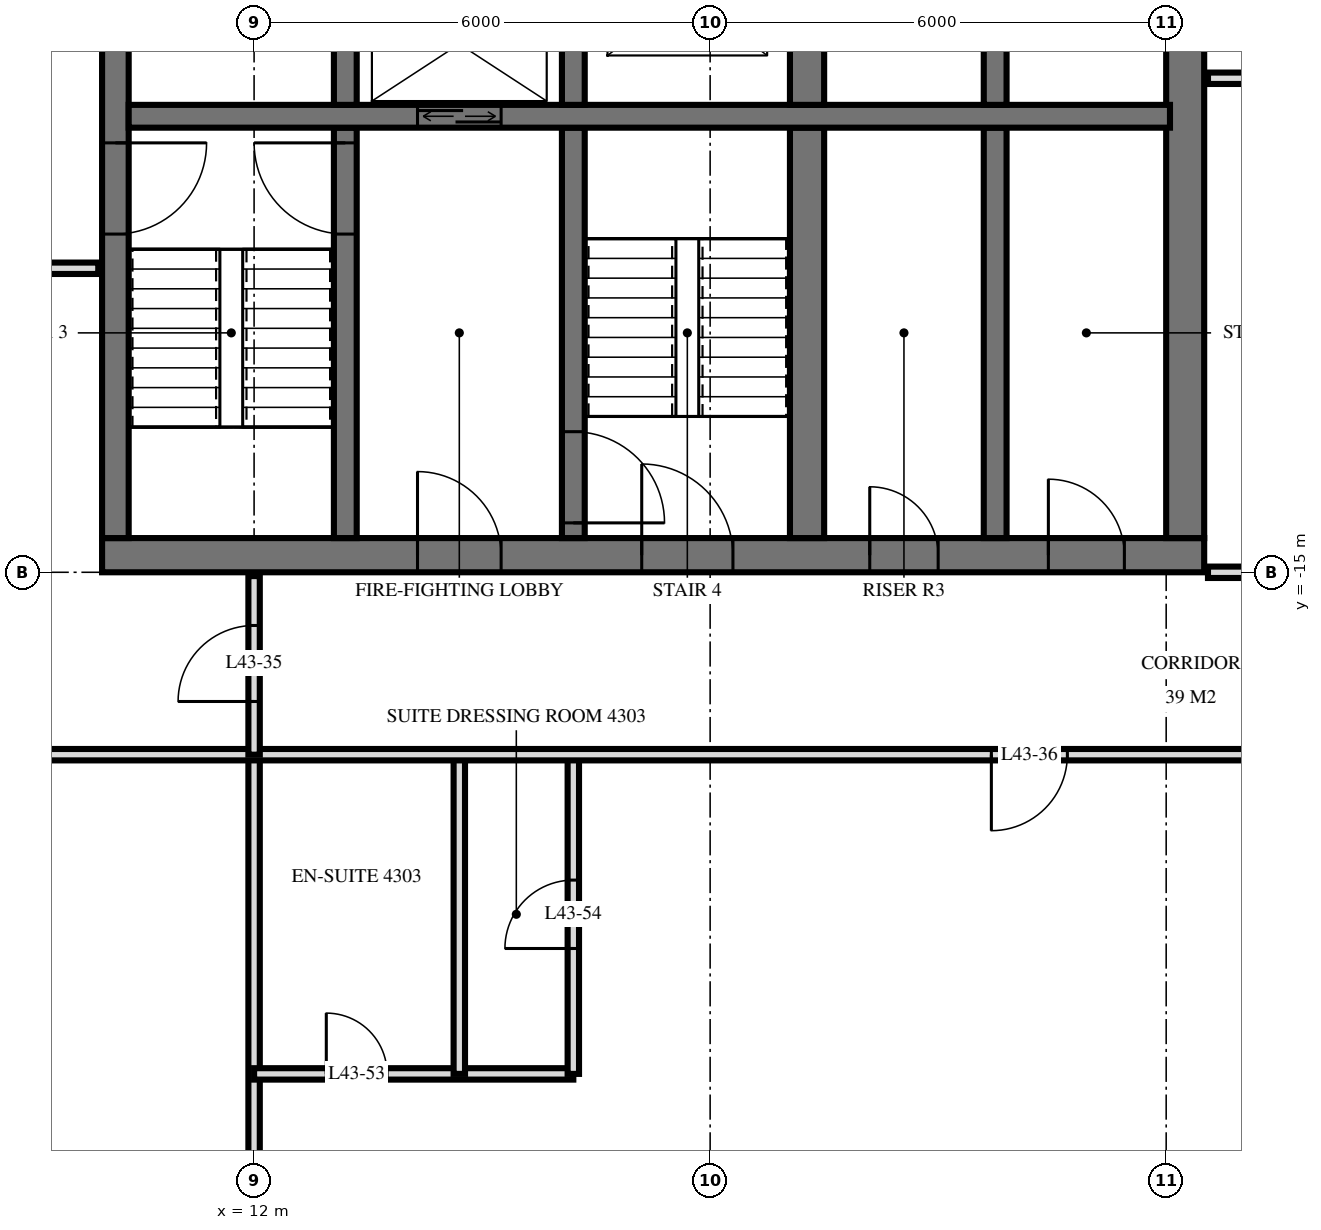
"""IFC4 building model, lengths in metres.
Left out: names, types, materials, properties, quantities, classifications, styles, units other than length and angle.
Written with IfcOpenShell. Run it as: python <this file> out.ifc"""

import sys

from ifc_helpers import new_model, si_unit, direction, frame, frame_2d, origin, place, context, subcontext, project, spatial, rectangle, extrude, element, fill, save


model = new_model("IFC4")
c1 = context("Model", 3, precision=1e-05, world=origin(), true_north=direction((0.0, 1.0)))
c2 = subcontext(c1, "Body", "Model", "MODEL_VIEW")
j1 = project(units=[si_unit("LENGTHUNIT", "METRE"), si_unit("PLANEANGLEUNIT", "RADIAN")], contexts=[c1])
p1 = place(None, origin())
s1 = spatial("IfcSite", under=j1, at=p1, CompositionType="ELEMENT")
p2 = place(p1, origin())
s2 = spatial("IfcBuilding", under=s1, at=p2, CompositionType="ELEMENT")
p3 = place(p2, frame((0.0, 0.0, 166.8)))
s3 = spatial("IfcBuildingStorey", under=s2, at=p3, CompositionType="ELEMENT", Elevation=166.8)
p4 = place(p3, frame((10.0, -14.775, 0.0), z_axis=(0.0, 0.0, 1.0), x_axis=(1.0, 0.0, 0.0)))
e1 = element("IfcWall", 1, at=p4, inside=s3, PredefinedType="SHEAR", context=c2, shape_type="SweptSolid", body=[
    extrude(rectangle(XDim=14.5, YDim=0.45, at=frame_2d((7.25, 0.0))), origin(), (0.0, 0.0, 1.0), 3.6),
])
p5 = place(p4, frame((7.1, 0.0, 0.0)))
e2 = element("IfcOpeningElement", 2, at=p5, cuts=e1, PredefinedType="OPENING", context=c2, shape_type="SweptSolid", body=[
    extrude(rectangle(XDim=1.2, YDim=2.1, at=frame_2d((0.6, 1.05))), frame((0.0, 0.235, 0.0), z_axis=(0.0, -1.0, 0.0), x_axis=(1.0, 0.0, 0.0)), (0.0, 0.0, 1.0), 0.47),
])
p6 = place(p4, frame((4.15, 0.0, 0.0)))
e3 = element("IfcOpeningElement", 3, at=p6, cuts=e1, PredefinedType="OPENING", context=c2, shape_type="SweptSolid", body=[
    extrude(rectangle(XDim=1.1, YDim=2.1, at=frame_2d((0.55, 1.05))), frame((0.0, 0.235, 0.0), z_axis=(0.0, -1.0, 0.0), x_axis=(1.0, 0.0, 0.0)), (0.0, 0.0, 1.0), 0.47),
])
p7 = place(p4, frame((10.1, 0.0, 0.0)))
e4 = element("IfcOpeningElement", 4, at=p7, cuts=e1, PredefinedType="OPENING", context=c2, shape_type="SweptSolid", body=[
    extrude(rectangle(XDim=0.9, YDim=2.1, at=frame_2d((0.45, 1.05))), frame((0.0, 0.235, 0.0), z_axis=(0.0, -1.0, 0.0), x_axis=(1.0, 0.0, 0.0)), (0.0, 0.0, 1.0), 0.47),
])
p8 = place(p4, frame((12.45, 0.0, 0.0)))
e5 = element("IfcOpeningElement", 5, at=p8, cuts=e1, PredefinedType="OPENING", context=c2, shape_type="SweptSolid", body=[
    extrude(rectangle(XDim=1.0, YDim=2.1, at=frame_2d((0.5, 1.05))), frame((0.0, 0.235, 0.0), z_axis=(0.0, -1.0, 0.0), x_axis=(1.0, 0.0, 0.0)), (0.0, 0.0, 1.0), 0.47),
])
p9 = place(p3, frame((10.175, -14.55, 0.0), z_axis=(0.0, 0.0, 1.0), x_axis=(0.0, 1.0, 0.0)))
e6 = element("IfcWall", 6, at=p9, inside=s3, PredefinedType="SHEAR", context=c2, shape_type="SweptSolid", body=[
    extrude(rectangle(XDim=14.1, YDim=0.35, at=frame_2d((7.05, 0.0))), origin(), (0.0, 0.0, 1.0), 3.6),
])
p10 = place(p9, frame((8.4, 0.0, 0.0)))
e7 = element("IfcOpeningElement", 7, at=p10, cuts=e6, PredefinedType="OPENING", context=c2, shape_type="SweptSolid", body=[
    extrude(rectangle(XDim=1.4, YDim=2.4, at=frame_2d((0.7, 1.2))), frame((0.0, 0.185, 0.0), z_axis=(0.0, -1.0, 0.0), x_axis=(1.0, 0.0, 0.0)), (0.0, 0.0, 1.0), 0.37),
])
p11 = place(p9, frame((10.0, 0.0, 0.0)))
e8 = element("IfcOpeningElement", 8, at=p11, cuts=e6, PredefinedType="OPENING", context=c2, shape_type="SweptSolid", body=[
    extrude(rectangle(XDim=1.4, YDim=2.4, at=frame_2d((0.7, 1.2))), frame((0.0, 0.185, 0.0), z_axis=(0.0, -1.0, 0.0), x_axis=(1.0, 0.0, 0.0)), (0.0, 0.0, 1.0), 0.37),
])
p12 = place(p9, frame((4.0, 0.0, 0.0)))
e9 = element("IfcOpeningElement", 9, at=p12, cuts=e6, PredefinedType="OPENING", context=c2, shape_type="SweptSolid", body=[
    extrude(rectangle(XDim=1.2, YDim=2.1, at=frame_2d((0.6, 1.05))), frame((0.0, 0.185, 0.0), z_axis=(0.0, -1.0, 0.0), x_axis=(1.0, 0.0, 0.0)), (0.0, 0.0, 1.0), 0.37),
])
p13 = place(p3, frame((24.25, -14.55, 0.0), z_axis=(0.0, 0.0, 1.0), x_axis=(0.0, 1.0, 0.0)))
e10 = element("IfcWall", 10, at=p13, inside=s3, PredefinedType="SHEAR", context=c2, shape_type="SweptSolid", body=[
    extrude(rectangle(XDim=14.1, YDim=0.5, at=frame_2d((7.05, 0.0))), origin(), (0.0, 0.0, 1.0), 3.6),
])
p14 = place(p3, frame((10.35, -9.0, 0.0), z_axis=(0.0, 0.0, 1.0), x_axis=(1.0, 0.0, 0.0)))
e11 = element("IfcWall", 11, at=p14, inside=s3, PredefinedType="SHEAR", context=c2, shape_type="SweptSolid", body=[
    extrude(rectangle(XDim=13.7, YDim=0.3, at=frame_2d((6.85, 0.0))), origin(), (0.0, 0.0, 1.0), 3.6),
])
p15 = place(p14, frame((3.8, 0.0, 0.0)))
e12 = element("IfcOpeningElement", 12, at=p15, cuts=e11, PredefinedType="OPENING", context=c2, shape_type="SweptSolid", body=[
    extrude(rectangle(XDim=1.1, YDim=2.1, at=frame_2d((0.55, 1.05))), frame((0.0, 0.16, 0.0), z_axis=(0.0, -1.0, 0.0), x_axis=(1.0, 0.0, 0.0)), (0.0, 0.0, 1.0), 0.32),
])
p16 = place(p3, frame((13.2, -8.85, 0.0), z_axis=(0.0, 0.0, 1.0), x_axis=(0.0, 1.0, 0.0)))
e13 = element("IfcWall", 13, at=p16, inside=s3, PredefinedType="SHEAR", context=c2, shape_type="SweptSolid", body=[
    extrude(rectangle(XDim=2.3, YDim=0.3, at=frame_2d((1.15, 0.0))), origin(), (0.0, 0.0, 1.0), 3.6),
])
p17 = place(p3, frame((13.2, -14.55, 0.0), z_axis=(0.0, 0.0, 1.0), x_axis=(0.0, 1.0, 0.0)))
e14 = element("IfcWall", 14, at=p17, inside=s3, PredefinedType="SHEAR", context=c2, shape_type="SweptSolid", body=[
    extrude(rectangle(XDim=5.4, YDim=0.3, at=frame_2d((2.7, 0.0))), origin(), (0.0, 0.0, 1.0), 3.6),
])
p18 = place(p17, frame((4.0, 0.0, 0.0)))
e15 = element("IfcOpeningElement", 15, at=p18, cuts=e14, PredefinedType="OPENING", context=c2, shape_type="SweptSolid", body=[
    extrude(rectangle(XDim=1.2, YDim=2.1, at=frame_2d((0.6, 1.05))), frame((0.0, 0.16, 0.0), z_axis=(0.0, -1.0, 0.0), x_axis=(1.0, 0.0, 0.0)), (0.0, 0.0, 1.0), 0.32),
])
p19 = place(p3, frame((16.2, -8.85, 0.0), z_axis=(0.0, 0.0, 1.0), x_axis=(0.0, 1.0, 0.0)))
e16 = element("IfcWall", 16, at=p19, inside=s3, PredefinedType="SHEAR", context=c2, shape_type="SweptSolid", body=[
    extrude(rectangle(XDim=2.3, YDim=0.3, at=frame_2d((1.15, 0.0))), origin(), (0.0, 0.0, 1.0), 3.6),
])
p20 = place(p3, frame((16.2, -14.55, 0.0), z_axis=(0.0, 0.0, 1.0), x_axis=(0.0, 1.0, 0.0)))
e17 = element("IfcWall", 17, at=p20, inside=s3, PredefinedType="SHEAR", context=c2, shape_type="SweptSolid", body=[
    extrude(rectangle(XDim=5.4, YDim=0.3, at=frame_2d((2.7, 0.0))), origin(), (0.0, 0.0, 1.0), 3.6),
])
p21 = place(p20, frame((0.2, 0.0, 0.0)))
e18 = element("IfcOpeningElement", 18, at=p21, cuts=e17, PredefinedType="OPENING", context=c2, shape_type="SweptSolid", body=[
    extrude(rectangle(XDim=1.2, YDim=2.1, at=frame_2d((0.6, 1.05))), frame((0.0, 0.16, 0.0), z_axis=(0.0, -1.0, 0.0), x_axis=(1.0, 0.0, 0.0)), (0.0, 0.0, 1.0), 0.32),
])
p22 = place(p3, frame((19.275, -8.85, 0.0), z_axis=(0.0, 0.0, 1.0), x_axis=(0.0, 1.0, 0.0)))
e19 = element("IfcWall", 19, at=p22, inside=s3, PredefinedType="SHEAR", context=c2, shape_type="SweptSolid", body=[
    extrude(rectangle(XDim=2.3, YDim=0.45, at=frame_2d((1.15, 0.0))), origin(), (0.0, 0.0, 1.0), 3.6),
])
p23 = place(p3, frame((19.275, -14.55, 0.0), z_axis=(0.0, 0.0, 1.0), x_axis=(0.0, 1.0, 0.0)))
e20 = element("IfcWall", 20, at=p23, inside=s3, PredefinedType="SHEAR", context=c2, shape_type="SweptSolid", body=[
    extrude(rectangle(XDim=5.4, YDim=0.45, at=frame_2d((2.7, 0.0))), origin(), (0.0, 0.0, 1.0), 3.6),
])
p24 = place(p3, frame((21.75, -8.85, 0.0), z_axis=(0.0, 0.0, 1.0), x_axis=(0.0, 1.0, 0.0)))
e21 = element("IfcWall", 21, at=p24, inside=s3, PredefinedType="SHEAR", context=c2, shape_type="SweptSolid", body=[
    extrude(rectangle(XDim=2.3, YDim=0.3, at=frame_2d((1.15, 0.0))), origin(), (0.0, 0.0, 1.0), 3.6),
])
p25 = place(p3, frame((21.75, -14.55, 0.0), z_axis=(0.0, 0.0, 1.0), x_axis=(0.0, 1.0, 0.0)))
e22 = element("IfcWall", 22, at=p25, inside=s3, PredefinedType="SHEAR", context=c2, shape_type="SweptSolid", body=[
    extrude(rectangle(XDim=5.4, YDim=0.3, at=frame_2d((2.7, 0.0))), origin(), (0.0, 0.0, 1.0), 3.6),
])
p26 = place(p3, frame((16.2, -21.6, 0.0), z_axis=(0.0, 0.0, 1.0), x_axis=(0.0, 1.0, 0.0)))
e23 = element("IfcWall", 23, at=p26, inside=s3, PredefinedType="PARTITIONING", context=c2, shape_type="SweptSolid", body=[
    extrude(rectangle(XDim=4.2, YDim=0.15, at=frame_2d((2.1, 0.0))), origin(), (0.0, 0.0, 1.0), 3.32),
])
p27 = place(p26, frame((1.65, 0.0, 0.0)))
e24 = element("IfcOpeningElement", 24, at=p27, cuts=e23, PredefinedType="OPENING", context=c2, shape_type="SweptSolid", body=[
    extrude(rectangle(XDim=0.9, YDim=2.1, at=frame_2d((0.45, 1.05))), frame((0.0, 0.085, 0.0), z_axis=(0.0, -1.0, 0.0), x_axis=(1.0, 0.0, 0.0)), (0.0, 0.0, 1.0), 0.17),
])
p28 = place(p3, frame((14.7, -21.6, 0.0), z_axis=(0.0, 0.0, 1.0), x_axis=(0.0, 1.0, 0.0)))
e25 = element("IfcWall", 25, at=p28, inside=s3, PredefinedType="PARTITIONING", context=c2, shape_type="SweptSolid", body=[
    extrude(rectangle(XDim=4.2, YDim=0.15, at=frame_2d((2.1, 0.0))), origin(), (0.0, 0.0, 1.0), 3.32),
])
p29 = place(p3, frame((12.0, -17.4, 0.0), z_axis=(0.0, 0.0, 1.0), x_axis=(0.0, 1.0, 0.0)))
e26 = element("IfcWall", 26, at=p29, inside=s3, PredefinedType="PARTITIONING", context=c2, shape_type="SweptSolid", body=[
    extrude(rectangle(XDim=2.35, YDim=0.15, at=frame_2d((1.175, 0.0))), origin(), (0.0, 0.0, 1.0), 3.32),
])
p30 = place(p29, frame((0.7, 0.0, 0.0)))
e27 = element("IfcOpeningElement", 27, at=p30, cuts=e26, PredefinedType="OPENING", context=c2, shape_type="SweptSolid", body=[
    extrude(rectangle(XDim=1.0, YDim=2.1, at=frame_2d((0.5, 1.05))), frame((0.0, 0.085, 0.0), z_axis=(0.0, -1.0, 0.0), x_axis=(1.0, 0.0, 0.0)), (0.0, 0.0, 1.0), 0.17),
])
p31 = place(p3, frame((12.0, -33.62, 0.0), z_axis=(0.0, 0.0, 1.0), x_axis=(0.0, 1.0, 0.0)))
e28 = element("IfcWall", 28, at=p31, inside=s3, PredefinedType="PARTITIONING", context=c2, shape_type="SweptSolid", body=[
    extrude(rectangle(XDim=16.22, YDim=0.15, at=frame_2d((8.11, 0.0))), origin(), (0.0, 0.0, 1.0), 3.32),
])
p32 = place(p3, frame((12.0, -21.6, 0.0), z_axis=(0.0, 0.0, 1.0), x_axis=(1.0, 0.0, 0.0)))
e29 = element("IfcWall", 29, at=p32, inside=s3, PredefinedType="PARTITIONING", context=c2, shape_type="SweptSolid", body=[
    extrude(rectangle(XDim=4.2, YDim=0.15, at=frame_2d((2.1, 0.0))), origin(), (0.0, 0.0, 1.0), 3.32),
])
p33 = place(p32, frame((0.95, 0.0, 0.0)))
e30 = element("IfcOpeningElement", 30, at=p33, cuts=e29, PredefinedType="OPENING", context=c2, shape_type="SweptSolid", body=[
    extrude(rectangle(XDim=0.8, YDim=2.1, at=frame_2d((0.4, 1.05))), frame((0.0, 0.085, 0.0), z_axis=(0.0, -1.0, 0.0), x_axis=(1.0, 0.0, 0.0)), (0.0, 0.0, 1.0), 0.17),
])
p34 = place(p3, frame((-28.02, -17.4, 0.0), z_axis=(0.0, 0.0, 1.0), x_axis=(1.0, 0.0, 0.0)))
e31 = element("IfcWall", 31, at=p34, inside=s3, PredefinedType="PARTITIONING", context=c2, shape_type="SweptSolid", body=[
    extrude(rectangle(XDim=56.04, YDim=0.15, at=frame_2d((28.02, 0.0))), origin(), (0.0, 0.0, 1.0), 3.32),
])
p35 = place(p34, frame((10.42, 0.0, 0.0)))
e32 = element("IfcOpeningElement", 32, at=p35, cuts=e31, PredefinedType="OPENING", context=c2, shape_type="SweptSolid", body=[
    extrude(rectangle(XDim=1.0, YDim=2.1, at=frame_2d((0.5, 1.05))), frame((0.0, 0.085, 0.0), z_axis=(0.0, -1.0, 0.0), x_axis=(1.0, 0.0, 0.0)), (0.0, 0.0, 1.0), 0.17),
])
p36 = place(p34, frame((2.32, 0.0, 0.0)))
e33 = element("IfcOpeningElement", 33, at=p36, cuts=e31, PredefinedType="OPENING", context=c2, shape_type="SweptSolid", body=[
    extrude(rectangle(XDim=1.0, YDim=2.1, at=frame_2d((0.5, 1.05))), frame((0.0, 0.085, 0.0), z_axis=(0.0, -1.0, 0.0), x_axis=(1.0, 0.0, 0.0)), (0.0, 0.0, 1.0), 0.17),
])
p37 = place(p34, frame((49.72, 0.0, 0.0)))
e34 = element("IfcOpeningElement", 34, at=p37, cuts=e31, PredefinedType="OPENING", context=c2, shape_type="SweptSolid", body=[
    extrude(rectangle(XDim=1.0, YDim=2.1, at=frame_2d((0.5, 1.05))), frame((0.0, 0.085, 0.0), z_axis=(0.0, -1.0, 0.0), x_axis=(1.0, 0.0, 0.0)), (0.0, 0.0, 1.0), 0.17),
])
p38 = place(p34, frame((23.02, 0.0, 0.0)))
e35 = element("IfcOpeningElement", 35, at=p38, cuts=e31, PredefinedType="OPENING", context=c2, shape_type="SweptSolid", body=[
    extrude(rectangle(XDim=1.0, YDim=2.1, at=frame_2d((0.5, 1.05))), frame((0.0, 0.085, 0.0), z_axis=(0.0, -1.0, 0.0), x_axis=(1.0, 0.0, 0.0)), (0.0, 0.0, 1.0), 0.17),
])
p39 = place(p34, frame((35.02, 0.0, 0.0)))
e36 = element("IfcOpeningElement", 36, at=p39, cuts=e31, PredefinedType="OPENING", context=c2, shape_type="SweptSolid", body=[
    extrude(rectangle(XDim=1.0, YDim=2.1, at=frame_2d((0.5, 1.05))), frame((0.0, 0.085, 0.0), z_axis=(0.0, -1.0, 0.0), x_axis=(1.0, 0.0, 0.0)), (0.0, 0.0, 1.0), 0.17),
])
p40 = place(p3, frame((24.55, -15.0, 0.0), z_axis=(0.0, 0.0, 1.0), x_axis=(1.0, 0.0, 0.0)))
e37 = element("IfcWall", 37, at=p40, inside=s3, PredefinedType="PARTITIONING", context=c2, shape_type="SweptSolid", body=[
    extrude(rectangle(XDim=3.47, YDim=0.15, at=frame_2d((1.735, 0.0))), origin(), (0.0, 0.0, 1.0), 3.32),
])
p41 = place(p40, frame((0.9, 0.0, 0.0)))
e38 = element("IfcOpeningElement", 38, at=p41, cuts=e37, PredefinedType="OPENING", context=c2, shape_type="SweptSolid", body=[
    extrude(rectangle(XDim=1.0, YDim=2.1, at=frame_2d((0.5, 1.05))), frame((0.0, 0.085, 0.0), z_axis=(0.0, -1.0, 0.0), x_axis=(1.0, 0.0, 0.0)), (0.0, 0.0, 1.0), 0.17),
])
p42 = place(p3, frame((-9.95, -11.0, 0.0), z_axis=(0.0, 0.0, 1.0), x_axis=(1.0, 0.0, 0.0)))
e39 = element("IfcWall", 39, at=p42, inside=s3, PredefinedType="PARTITIONING", context=c2, shape_type="SweptSolid", body=[
    extrude(rectangle(XDim=19.9, YDim=0.15, at=frame_2d((9.95, 0.0))), origin(), (0.0, 0.0, 1.0), 3.32),
])
p43 = place(p42, frame((9.45, 0.0, 0.0)))
e40 = element("IfcOpeningElement", 40, at=p43, cuts=e39, PredefinedType="OPENING", context=c2, shape_type="SweptSolid", body=[
    extrude(rectangle(XDim=1.0, YDim=2.1, at=frame_2d((0.5, 1.05))), frame((0.0, 0.085, 0.0), z_axis=(0.0, -1.0, 0.0), x_axis=(1.0, 0.0, 0.0)), (0.0, 0.0, 1.0), 0.17),
])
p44 = place(p42, frame((3.45, 0.0, 0.0)))
e41 = element("IfcOpeningElement", 41, at=p44, cuts=e39, PredefinedType="OPENING", context=c2, shape_type="SweptSolid", body=[
    extrude(rectangle(XDim=1.0, YDim=2.1, at=frame_2d((0.5, 1.05))), frame((0.0, 0.085, 0.0), z_axis=(0.0, -1.0, 0.0), x_axis=(1.0, 0.0, 0.0)), (0.0, 0.0, 1.0), 0.17),
])
p45 = place(p3, frame((24.55, -8.5, 0.0), z_axis=(0.0, 0.0, 1.0), x_axis=(1.0, 0.0, 0.0)))
e42 = element("IfcWall", 42, at=p45, inside=s3, PredefinedType="PARTITIONING", context=c2, shape_type="SweptSolid", body=[
    extrude(rectangle(XDim=3.47, YDim=0.15, at=frame_2d((1.735, 0.0))), origin(), (0.0, 0.0, 1.0), 3.32),
])
p46 = place(p45, frame((1.35, 0.0, 0.0)))
e43 = element("IfcOpeningElement", 43, at=p46, cuts=e42, PredefinedType="OPENING", context=c2, shape_type="SweptSolid", body=[
    extrude(rectangle(XDim=0.9, YDim=2.1, at=frame_2d((0.45, 1.05))), frame((0.0, 0.085, 0.0), z_axis=(0.0, -1.0, 0.0), x_axis=(1.0, 0.0, 0.0)), (0.0, 0.0, 1.0), 0.17),
])
p47 = place(p15, origin())
e44 = element("IfcDoor", 44, at=p47, inside=s3, OperationType="DOUBLE_DOOR_SLIDING", PredefinedType="USERDEFINED", context=c2, shape_type="SweptSolid", body=[
    extrude(rectangle(XDim=1.1, YDim=2.1, at=frame_2d((0.55, 1.05))), frame((0.0, 0.025, 0.0), z_axis=(0.0, -1.0, 0.0), x_axis=(1.0, 0.0, 0.0)), (0.0, 0.0, 1.0), 0.05),
])
fill(e12, e44)
p48 = place(p12, frame((0.6, 0.0, 0.0), z_axis=(0.0, 0.0, 1.0), x_axis=(-1.0, 0.0, 0.0)))
e45 = element("IfcDoor", 45, at=p48, inside=s3, OperationType="SINGLE_SWING_RIGHT", PredefinedType="DOOR", context=c2, shape_type="SweptSolid", body=[
    extrude(rectangle(XDim=1.2, YDim=2.1, at=frame_2d((0.0, 1.05))), frame((0.0, -0.025, 0.0), z_axis=(0.0, 1.0, 0.0), x_axis=(-1.0, 0.0, 0.0)), (0.0, 0.0, 1.0), 0.05),
])
fill(e9, e45)
p49 = place(p5, origin())
e46 = element("IfcDoor", 46, at=p49, inside=s3, OperationType="SINGLE_SWING_RIGHT", PredefinedType="DOOR", context=c2, shape_type="SweptSolid", body=[
    extrude(rectangle(XDim=1.2, YDim=2.1, at=frame_2d((0.6, 1.05))), frame((0.0, 0.025, 0.0), z_axis=(0.0, -1.0, 0.0), x_axis=(1.0, 0.0, 0.0)), (0.0, 0.0, 1.0), 0.05),
])
fill(e2, e46)
p50 = place(p6, origin())
e47 = element("IfcDoor", 47, at=p50, inside=s3, OperationType="SINGLE_SWING_RIGHT", PredefinedType="DOOR", context=c2, shape_type="SweptSolid", body=[
    extrude(rectangle(XDim=1.1, YDim=2.1, at=frame_2d((0.55, 1.05))), frame((0.0, 0.025, 0.0), z_axis=(0.0, -1.0, 0.0), x_axis=(1.0, 0.0, 0.0)), (0.0, 0.0, 1.0), 0.05),
])
fill(e3, e47)
p51 = place(p7, origin())
e48 = element("IfcDoor", 48, at=p51, inside=s3, OperationType="SINGLE_SWING_RIGHT", PredefinedType="DOOR", context=c2, shape_type="SweptSolid", body=[
    extrude(rectangle(XDim=0.9, YDim=2.1, at=frame_2d((0.45, 1.05))), frame((0.0, 0.025, 0.0), z_axis=(0.0, -1.0, 0.0), x_axis=(1.0, 0.0, 0.0)), (0.0, 0.0, 1.0), 0.05),
])
fill(e4, e48)
p52 = place(p8, origin())
e49 = element("IfcDoor", 49, at=p52, inside=s3, OperationType="SINGLE_SWING_RIGHT", PredefinedType="DOOR", context=c2, shape_type="SweptSolid", body=[
    extrude(rectangle(XDim=1.0, YDim=2.1, at=frame_2d((0.5, 1.05))), frame((0.0, 0.025, 0.0), z_axis=(0.0, -1.0, 0.0), x_axis=(1.0, 0.0, 0.0)), (0.0, 0.0, 1.0), 0.05),
])
fill(e5, e49)
p53 = place(p18, origin())
e50 = element("IfcDoor", 50, at=p53, inside=s3, OperationType="SINGLE_SWING_LEFT", PredefinedType="DOOR", context=c2, shape_type="SweptSolid", body=[
    extrude(rectangle(XDim=1.2, YDim=2.1, at=frame_2d((0.6, 1.05))), frame((0.0, 0.025, 0.0), z_axis=(0.0, -1.0, 0.0), x_axis=(1.0, 0.0, 0.0)), (0.0, 0.0, 1.0), 0.05),
])
fill(e15, e50)
p54 = place(p21, frame((0.6, 0.0, 0.0), z_axis=(0.0, 0.0, 1.0), x_axis=(-1.0, 0.0, 0.0)))
e51 = element("IfcDoor", 51, at=p54, inside=s3, OperationType="SINGLE_SWING_LEFT", PredefinedType="DOOR", context=c2, shape_type="SweptSolid", body=[
    extrude(rectangle(XDim=1.2, YDim=2.1, at=frame_2d((0.0, 1.05))), frame((0.0, -0.025, 0.0), z_axis=(0.0, 1.0, 0.0), x_axis=(-1.0, 0.0, 0.0)), (0.0, 0.0, 1.0), 0.05),
])
fill(e18, e51)
p55 = place(p30, origin())
e52 = element("IfcDoor", 52, at=p55, inside=s3, OperationType="SINGLE_SWING_RIGHT", PredefinedType="DOOR", context=c2, shape_type="SweptSolid", body=[
    extrude(rectangle(XDim=1.0, YDim=2.1, at=frame_2d((0.5, 1.05))), frame((0.0, 0.025, 0.0), z_axis=(0.0, -1.0, 0.0), x_axis=(1.0, 0.0, 0.0)), (0.0, 0.0, 1.0), 0.05),
])
fill(e27, e52)
p56 = place(p37, frame((0.5, 0.0, 0.0), z_axis=(0.0, 0.0, 1.0), x_axis=(-1.0, 0.0, 0.0)))
e53 = element("IfcDoor", 53, at=p56, inside=s3, OperationType="SINGLE_SWING_LEFT", PredefinedType="DOOR", context=c2, shape_type="SweptSolid", body=[
    extrude(rectangle(XDim=1.0, YDim=2.1, at=frame_2d((0.0, 1.05))), frame((0.0, -0.025, 0.0), z_axis=(0.0, 1.0, 0.0), x_axis=(-1.0, 0.0, 0.0)), (0.0, 0.0, 1.0), 0.05),
])
fill(e34, e53)
p57 = place(p33, origin())
e54 = element("IfcDoor", 54, at=p57, inside=s3, OperationType="SINGLE_SWING_RIGHT", PredefinedType="DOOR", context=c2, shape_type="SweptSolid", body=[
    extrude(rectangle(XDim=0.8, YDim=2.1, at=frame_2d((0.4, 1.05))), frame((0.0, 0.025, 0.0), z_axis=(0.0, -1.0, 0.0), x_axis=(1.0, 0.0, 0.0)), (0.0, 0.0, 1.0), 0.05),
])
fill(e30, e54)
p58 = place(p27, origin())
e55 = element("IfcDoor", 55, at=p58, inside=s3, OperationType="SINGLE_SWING_RIGHT", PredefinedType="DOOR", context=c2, shape_type="SweptSolid", body=[
    extrude(rectangle(XDim=0.9, YDim=2.1, at=frame_2d((0.45, 1.05))), frame((0.0, 0.025, 0.0), z_axis=(0.0, -1.0, 0.0), x_axis=(1.0, 0.0, 0.0)), (0.0, 0.0, 1.0), 0.05),
])
fill(e24, e55)
save(model, sys.argv[1])
